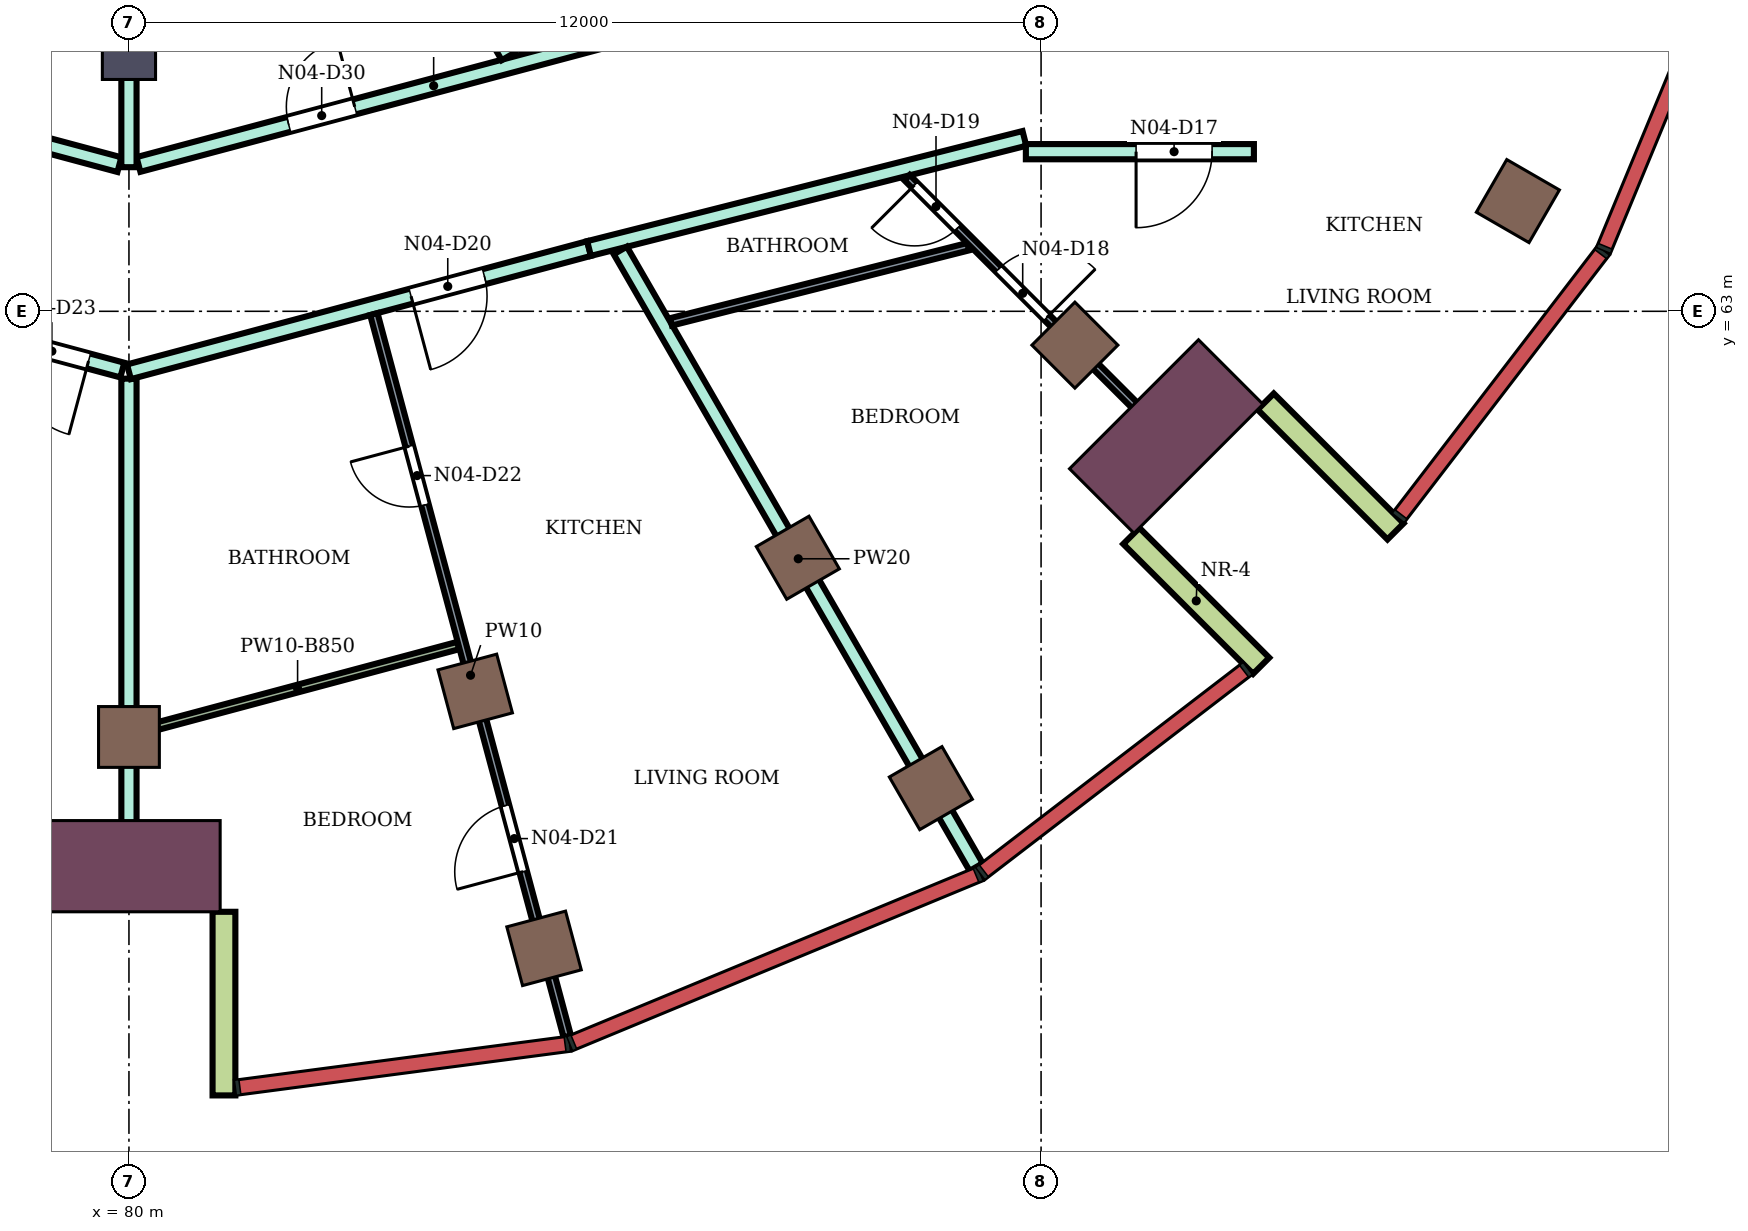
"""IFC4 building model, lengths in metres.
Left out: names, types, materials, properties, quantities, classifications, styles, units other than length and angle.
Written with IfcOpenShell. Run it as: python <this file> out.ifc"""

import sys

from ifc_helpers import new_model, si_unit, direction, frame, frame_2d, origin, origin_2d, place, context, subcontext, project, spatial, rectangle, extrude, element, fill, save


model = new_model("IFC4")
c1 = context("Model", 3, precision=1e-05, world=origin(), true_north=direction((0.0, 1.0)))
c2 = subcontext(c1, "Body", "Model", "MODEL_VIEW")
j1 = project(units=[si_unit("LENGTHUNIT", "METRE"), si_unit("PLANEANGLEUNIT", "RADIAN")], contexts=[c1])
p1 = place(None, origin())
s1 = spatial("IfcSite", under=j1, at=p1, CompositionType="ELEMENT")
p2 = place(p1, origin())
s2 = spatial("IfcBuilding", under=s1, at=p2, CompositionType="ELEMENT")
p3 = place(p2, frame((0.0, 0.0, 305.1)))
s3 = spatial("IfcBuildingStorey", under=s2, at=p3, CompositionType="ELEMENT", Elevation=305.1)
for number, where, z_axis, x_axis in (
    (1, (85.461, 54.619, 0.0), (0.0, 0.0, 1.0), (0.259, -0.966, 0.0)),
    (2, (90.55, 56.727, 0.0), (0.0, 0.0, 1.0), (0.5, -0.866, 0.0)),
    (3, (98.273, 64.45, 0.0), (0.0, 0.0, 1.0), (0.866, -0.5, 0.0)),
    (4, (80.0, 57.4, 0.0), (0.0, 0.0, 1.0), (0.0, -1.0, 0.0)),
    (5, (84.555, 58.0, 0.0), (0.0, 0.0, 1.0), (0.259, -0.966, 0.0)),
    (6, (88.8, 59.758, 0.0), (0.0, 0.0, 1.0), (0.5, -0.866, 0.0)),
    (7, (92.445, 62.555, 0.0), (0.0, 0.0, 1.0), (0.707, -0.707, 0.0)),
):
    element("IfcColumn", number, at=place(p3, frame(where, z_axis=z_axis, x_axis=x_axis)), inside=s3, PredefinedType="COLUMN", context=c2, shape_type="SweptSolid", body=[
        extrude(rectangle(XDim=0.8, YDim=0.8, at=origin_2d()), origin(), (0.0, 0.0, 1.0), 4.2),
    ])
p4 = place(p3, frame((80.0, 66.4, 0.0), z_axis=(0.0, 0.0, 1.0), x_axis=(0.0, -1.0, 0.0)))
e8 = element("IfcColumn", 8, at=p4, inside=s3, PredefinedType="COLUMN", context=c2, shape_type="SweptSolid", body=[
    extrude(rectangle(XDim=0.7, YDim=0.7, at=origin_2d()), origin(), (0.0, 0.0, 1.0), 4.2),
])
for number, where, z_axis, x_axis in (
    (9, (80.0, 55.7, 0.0), (0.0, 0.0, 1.0), (0.0, -1.0, 0.0)),
    (10, (93.647, 61.353, 0.0), (0.0, 0.0, 1.0), (0.707, -0.707, 0.0)),
):
    element("IfcColumn", number, at=place(p3, frame(where, z_axis=z_axis, x_axis=x_axis)), inside=s3, PredefinedType="COLUMN", context=c2, shape_type="SweptSolid", body=[
        extrude(rectangle(XDim=1.2, YDim=2.4, at=origin_2d()), origin(), (0.0, 0.0, 1.0), 4.2),
    ])
for number, where, z_axis, x_axis in (
    (11, (81.25, 55.1, 0.0), (0.0, 0.0, 1.0), (0.0, -1.0, 0.0)),
    (12, (93.188, 60.045, 0.0), (0.0, 0.0, 1.0), (0.707, -0.707, 0.0)),
    (13, (94.955, 61.812, 0.0), (0.0, 0.0, 1.0), (0.707, -0.707, 0.0)),
):
    element("IfcWall", number, at=place(p3, frame(where, z_axis=z_axis, x_axis=x_axis)), inside=s3, PredefinedType="NOTDEFINED", context=c2, shape_type="SweptSolid", body=[
        extrude(rectangle(XDim=2.416, YDim=0.3, at=frame_2d((1.208, 0.0))), origin(), (0.0, 0.0, 1.0), 4.2),
    ])
p5 = place(p3, frame((73.947, 63.826, 0.0), z_axis=(0.0, 0.0, 1.0), x_axis=(0.965902169454, -0.258907317479, 0.0)))
e14 = element("IfcWall", 14, at=p5, inside=s3, PredefinedType="PARTITIONING", context=c2, shape_type="SweptSolid", body=[
    extrude(rectangle(XDim=6.177, YDim=0.2, at=frame_2d((3.088, 0.0))), origin(), (0.0, 0.0, 1.0), 3.75),
])
p6 = place(p5, frame((4.717, 0.0, 0.0)))
e15 = element("IfcOpeningElement", 15, at=p6, cuts=e14, PredefinedType="OPENING", context=c2, shape_type="SweptSolid", body=[
    extrude(rectangle(XDim=1.0, YDim=2.1, at=frame_2d((0.5, 1.05))), frame((0.0, 0.11, 0.0), z_axis=(0.0, -1.0, 0.0), x_axis=(1.0, 0.0, 0.0)), (0.0, 0.0, 1.0), 0.22),
])
p7 = place(p3, frame((74.603, 66.342, 0.0), z_axis=(0.0, 0.0, 1.0), x_axis=(0.965920893652, -0.258837453254, 0.0)))
e16 = element("IfcWall", 16, at=p7, inside=s3, PredefinedType="PARTITIONING", context=c2, shape_type="SweptSolid", body=[
    extrude(rectangle(XDim=5.458, YDim=0.2, at=frame_2d((2.729, 0.0))), origin(), (0.0, 0.0, 1.0), 3.75),
])
p8 = place(p7, frame((2.512, 0.0, 0.0)))
e17 = element("IfcOpeningElement", 17, at=p8, cuts=e16, PredefinedType="OPENING", context=c2, shape_type="SweptSolid", body=[
    extrude(rectangle(XDim=0.9, YDim=2.1, at=frame_2d((0.45, 1.05))), frame((0.0, 0.11, 0.0), z_axis=(0.0, -1.0, 0.0), x_axis=(1.0, 0.0, 0.0)), (0.0, 0.0, 1.0), 0.22),
])
p9 = place(p3, frame((80.125, 64.932, 0.0), z_axis=(0.0, 0.0, 1.0), x_axis=(0.966236955806, 0.257655089674, 0.0)))
e18 = element("IfcWall", 18, at=p9, inside=s3, PredefinedType="PARTITIONING", context=c2, shape_type="SweptSolid", body=[
    extrude(rectangle(XDim=8.039, YDim=0.2, at=frame_2d((4.02, 0.0))), origin(), (0.0, 0.0, 1.0), 3.75),
])
p10 = place(p9, frame((6.298, 0.0, 0.0)))
e19 = element("IfcOpeningElement", 19, at=p10, cuts=e18, PredefinedType="OPENING", context=c2, shape_type="SweptSolid", body=[
    extrude(rectangle(XDim=0.9, YDim=2.1, at=frame_2d((0.45, 1.05))), frame((0.0, 0.11, 0.0), z_axis=(0.0, -1.0, 0.0), x_axis=(1.0, 0.0, 0.0)), (0.0, 0.0, 1.0), 0.22),
])
p11 = place(p9, frame((2.045, 0.0, 0.0)))
e20 = element("IfcOpeningElement", 20, at=p11, cuts=e18, PredefinedType="OPENING", context=c2, shape_type="SweptSolid", body=[
    extrude(rectangle(XDim=0.9, YDim=2.1, at=frame_2d((0.45, 1.05))), frame((0.0, 0.11, 0.0), z_axis=(0.0, -1.0, 0.0), x_axis=(1.0, 0.0, 0.0)), (0.0, 0.0, 1.0), 0.22),
])
p12 = place(p3, frame((80.0, 55.3, 0.0), z_axis=(0.0, 0.0, 1.0), x_axis=(0.0, 1.0, 0.0)))
e21 = element("IfcWall", 21, at=p12, inside=s3, PredefinedType="PARTITIONING", context=c2, shape_type="SweptSolid", body=[
    extrude(rectangle(XDim=6.814, YDim=0.2, at=frame_2d((3.407, 0.0))), origin(), (0.0, 0.0, 1.0), 3.75),
])
p13 = place(p3, frame((80.0, 62.204, 0.0), z_axis=(0.0, 0.0, 1.0), x_axis=(0.965938139786, 0.258773086132, 0.0)))
e22 = element("IfcWall", 22, at=p13, inside=s3, PredefinedType="PARTITIONING", context=c2, shape_type="SweptSolid", body=[
    extrude(rectangle(XDim=6.266, YDim=0.2, at=frame_2d((3.133, 0.0))), origin(), (0.0, 0.0, 1.0), 3.75),
])
p14 = place(p13, frame((3.842, 0.0, 0.0)))
e23 = element("IfcOpeningElement", 23, at=p14, cuts=e22, PredefinedType="OPENING", context=c2, shape_type="SweptSolid", body=[
    extrude(rectangle(XDim=1.0, YDim=2.1, at=frame_2d((0.5, 1.05))), frame((0.0, 0.11, 0.0), z_axis=(0.0, -1.0, 0.0), x_axis=(1.0, 0.0, 0.0)), (0.0, 0.0, 1.0), 0.22),
])
p15 = place(p3, frame((80.0, 64.896, 0.0), z_axis=(0.0, 0.0, 1.0), x_axis=(0.0, 1.0, 0.0)))
e24 = element("IfcWall", 24, at=p15, inside=s3, PredefinedType="PARTITIONING", context=c2, shape_type="SweptSolid", body=[
    extrude(rectangle(XDim=2.405, YDim=0.2, at=frame_2d((1.203, 0.0))), origin(), (0.0, 0.0, 1.0), 3.75),
])
p16 = place(p3, frame((83.848, 68.333, 0.0), z_axis=(0.0, 0.0, 1.0), x_axis=(0.499873506666, -0.866098422429, 0.0)))
e25 = element("IfcWall", 25, at=p16, inside=s3, PredefinedType="PARTITIONING", context=c2, shape_type="SweptSolid", body=[
    extrude(rectangle(XDim=2.285, YDim=0.2, at=frame_2d((1.143, 0.0))), origin(), (0.0, 0.0, 1.0), 3.75),
])
p17 = place(p3, frame((86.053, 63.826, 0.0), z_axis=(0.0, 0.0, 1.0), x_axis=(0.969490004987, 0.245130843083, 0.0)))
e26 = element("IfcWall", 26, at=p17, inside=s3, PredefinedType="PARTITIONING", context=c2, shape_type="SweptSolid", body=[
    extrude(rectangle(XDim=5.908, YDim=0.2, at=frame_2d((2.954, 0.0))), origin(), (0.0, 0.0, 1.0), 3.75),
])
p18 = place(p3, frame((86.464, 63.8, 0.0), z_axis=(0.0, 0.0, 1.0), x_axis=(0.499890179513, -0.866088799389, 0.0)))
e27 = element("IfcWall", 27, at=p18, inside=s3, PredefinedType="PARTITIONING", context=c2, shape_type="SweptSolid", body=[
    extrude(rectangle(XDim=9.366, YDim=0.2, at=frame_2d((4.683, 0.0))), origin(), (0.0, 0.0, 1.0), 3.75),
])
p19 = place(p3, frame((91.8, 65.1, 0.0), z_axis=(0.0, 0.0, 1.0), x_axis=(1.0, 0.0, 0.0)))
e28 = element("IfcWall", 28, at=p19, inside=s3, PredefinedType="PARTITIONING", context=c2, shape_type="SweptSolid", body=[
    extrude(rectangle(XDim=3.0, YDim=0.2, at=frame_2d((1.5, 0.0))), origin(), (0.0, 0.0, 1.0), 3.75),
])
p20 = place(p19, frame((1.45, 0.0, 0.0)))
e29 = element("IfcOpeningElement", 29, at=p20, cuts=e28, PredefinedType="OPENING", context=c2, shape_type="SweptSolid", body=[
    extrude(rectangle(XDim=1.0, YDim=2.1, at=frame_2d((0.5, 1.05))), frame((0.0, 0.11, 0.0), z_axis=(0.0, -1.0, 0.0), x_axis=(1.0, 0.0, 0.0)), (0.0, 0.0, 1.0), 0.22),
])
p21 = place(p3, frame((80.106, 57.47, 0.0), z_axis=(0.0, 0.0, 1.0), x_axis=(0.96592388346, 0.25882629573, 0.0)))
e30 = element("IfcWall", 30, at=p21, inside=s3, PredefinedType="PARTITIONING", context=c2, shape_type="SweptSolid", body=[
    extrude(rectangle(XDim=4.374, YDim=0.1, at=frame_2d((2.187, 0.0))), origin(), (0.0, 0.0, 1.0), 3.35),
])
p22 = place(p3, frame((83.222, 62.964, 0.0), z_axis=(0.0, 0.0, 1.0), x_axis=(0.25865876373, -0.965968759301, 0.0)))
e31 = element("IfcWall", 31, at=p22, inside=s3, PredefinedType="PARTITIONING", context=c2, shape_type="SweptSolid", body=[
    extrude(rectangle(XDim=9.838, YDim=0.1, at=frame_2d((4.919, 0.0))), origin(), (0.0, 0.0, 1.0), 3.75),
])
p23 = place(p22, frame((6.694, 0.0, 0.0)))
e32 = element("IfcOpeningElement", 32, at=p23, cuts=e31, PredefinedType="OPENING", context=c2, shape_type="SweptSolid", body=[
    extrude(rectangle(XDim=0.9, YDim=2.1, at=frame_2d((0.45, 1.05))), frame((0.0, 0.06, 0.0), z_axis=(0.0, -1.0, 0.0), x_axis=(1.0, 0.0, 0.0)), (0.0, 0.0, 1.0), 0.12),
])
p24 = place(p22, frame((1.8, 0.0, 0.0)))
e33 = element("IfcOpeningElement", 33, at=p24, cuts=e31, PredefinedType="OPENING", context=c2, shape_type="SweptSolid", body=[
    extrude(rectangle(XDim=0.8, YDim=2.1, at=frame_2d((0.4, 1.05))), frame((0.0, 0.06, 0.0), z_axis=(0.0, -1.0, 0.0), x_axis=(1.0, 0.0, 0.0)), (0.0, 0.0, 1.0), 0.12),
])
p25 = place(p3, frame((87.132, 62.861, 0.0), z_axis=(0.0, 0.0, 1.0), x_axis=(0.969469230998, 0.245212989354, 0.0)))
e34 = element("IfcWall", 34, at=p25, inside=s3, PredefinedType="PARTITIONING", context=c2, shape_type="SweptSolid", body=[
    extrude(rectangle(XDim=4.032, YDim=0.1, at=frame_2d((2.016, 0.0))), origin(), (0.0, 0.0, 1.0), 3.75),
])
p26 = place(p3, frame((90.237, 64.759, 0.0), z_axis=(0.0, 0.0, 1.0), x_axis=(0.706966449742, -0.707247084787, 0.0)))
e35 = element("IfcWall", 35, at=p26, inside=s3, PredefinedType="PARTITIONING", context=c2, shape_type="SweptSolid", body=[
    extrude(rectangle(XDim=5.22, YDim=0.1, at=frame_2d((2.61, 0.0))), origin(), (0.0, 0.0, 1.0), 3.75),
])
p27 = place(p26, frame((1.702, 0.0, 0.0)))
e36 = element("IfcOpeningElement", 36, at=p27, cuts=e35, PredefinedType="OPENING", context=c2, shape_type="SweptSolid", body=[
    extrude(rectangle(XDim=0.9, YDim=2.1, at=frame_2d((0.45, 1.05))), frame((0.0, 0.06, 0.0), z_axis=(0.0, -1.0, 0.0), x_axis=(1.0, 0.0, 0.0)), (0.0, 0.0, 1.0), 0.12),
])
p28 = place(p26, frame((0.139, 0.0, 0.0)))
e37 = element("IfcOpeningElement", 37, at=p28, cuts=e35, PredefinedType="OPENING", context=c2, shape_type="SweptSolid", body=[
    extrude(rectangle(XDim=0.8, YDim=2.1, at=frame_2d((0.4, 1.05))), frame((0.0, 0.06, 0.0), z_axis=(0.0, -1.0, 0.0), x_axis=(1.0, 0.0, 0.0)), (0.0, 0.0, 1.0), 0.12),
])
p29 = place(p20, frame((1.0, 0.0, 0.0), z_axis=(0.0, 0.0, 1.0), x_axis=(-1.0, 0.0, 0.0)))
e38 = element("IfcDoor", 38, at=p29, inside=s3, OperationType="SINGLE_SWING_RIGHT", PredefinedType="DOOR", context=c2, shape_type="SweptSolid", body=[
    extrude(rectangle(XDim=1.0, YDim=2.1, at=frame_2d((0.5, 1.05))), frame((0.0, 0.025, 0.0), z_axis=(0.0, -1.0, 0.0), x_axis=(1.0, 0.0, 0.0)), (0.0, 0.0, 1.0), 0.05),
])
fill(e29, e38)
p30 = place(p27, origin())
e39 = element("IfcDoor", 39, at=p30, inside=s3, OperationType="SINGLE_SWING_RIGHT", PredefinedType="DOOR", context=c2, shape_type="SweptSolid", body=[
    extrude(rectangle(XDim=0.9, YDim=2.1, at=frame_2d((0.45, 1.05))), frame((0.0, 0.025, 0.0), z_axis=(0.0, -1.0, 0.0), x_axis=(1.0, 0.0, 0.0)), (0.0, 0.0, 1.0), 0.05),
])
fill(e36, e39)
p31 = place(p28, frame((0.8, 0.0, 0.0), z_axis=(0.0, 0.0, 1.0), x_axis=(-1.0, 0.0, 0.0)))
e40 = element("IfcDoor", 40, at=p31, inside=s3, OperationType="SINGLE_SWING_RIGHT", PredefinedType="DOOR", context=c2, shape_type="SweptSolid", body=[
    extrude(rectangle(XDim=0.8, YDim=2.1, at=frame_2d((0.4, 1.05))), frame((0.0, 0.025, 0.0), z_axis=(0.0, -1.0, 0.0), x_axis=(1.0, 0.0, 0.0)), (0.0, 0.0, 1.0), 0.05),
])
fill(e37, e40)
p32 = place(p14, frame((1.0, 0.0, 0.0), z_axis=(0.0, 0.0, 1.0), x_axis=(-1.0, 0.0, 0.0)))
e41 = element("IfcDoor", 41, at=p32, inside=s3, OperationType="SINGLE_SWING_RIGHT", PredefinedType="DOOR", context=c2, shape_type="SweptSolid", body=[
    extrude(rectangle(XDim=1.0, YDim=2.1, at=frame_2d((0.5, 1.05))), frame((0.0, 0.025, 0.0), z_axis=(0.0, -1.0, 0.0), x_axis=(1.0, 0.0, 0.0)), (0.0, 0.0, 1.0), 0.05),
])
fill(e23, e41)
p33 = place(p23, frame((0.9, 0.0, 0.0), z_axis=(0.0, 0.0, 1.0), x_axis=(-1.0, 0.0, 0.0)))
e42 = element("IfcDoor", 42, at=p33, inside=s3, OperationType="SINGLE_SWING_LEFT", PredefinedType="DOOR", context=c2, shape_type="SweptSolid", body=[
    extrude(rectangle(XDim=0.9, YDim=2.1, at=frame_2d((0.45, 1.05))), frame((0.0, 0.025, 0.0), z_axis=(0.0, -1.0, 0.0), x_axis=(1.0, 0.0, 0.0)), (0.0, 0.0, 1.0), 0.05),
])
fill(e32, e42)
p34 = place(p24, frame((0.8, 0.0, 0.0), z_axis=(0.0, 0.0, 1.0), x_axis=(-1.0, 0.0, 0.0)))
e43 = element("IfcDoor", 43, at=p34, inside=s3, OperationType="SINGLE_SWING_RIGHT", PredefinedType="DOOR", context=c2, shape_type="SweptSolid", body=[
    extrude(rectangle(XDim=0.8, YDim=2.1, at=frame_2d((0.4, 1.05))), frame((0.0, 0.025, 0.0), z_axis=(0.0, -1.0, 0.0), x_axis=(1.0, 0.0, 0.0)), (0.0, 0.0, 1.0), 0.05),
])
fill(e33, e43)
p35 = place(p6, frame((1.0, 0.0, 0.0), z_axis=(0.0, 0.0, 1.0), x_axis=(-1.0, 0.0, 0.0)))
e44 = element("IfcDoor", 44, at=p35, inside=s3, OperationType="SINGLE_SWING_LEFT", PredefinedType="DOOR", context=c2, shape_type="SweptSolid", body=[
    extrude(rectangle(XDim=1.0, YDim=2.1, at=frame_2d((0.5, 1.05))), frame((0.0, 0.025, 0.0), z_axis=(0.0, -1.0, 0.0), x_axis=(1.0, 0.0, 0.0)), (0.0, 0.0, 1.0), 0.05),
])
fill(e15, e44)
p36 = place(p11, origin())
e45 = element("IfcDoor", 45, at=p36, inside=s3, OperationType="SINGLE_SWING_RIGHT", PredefinedType="DOOR", context=c2, shape_type="SweptSolid", body=[
    extrude(rectangle(XDim=0.9, YDim=2.1, at=frame_2d((0.45, 1.05))), frame((0.0, 0.025, 0.0), z_axis=(0.0, -1.0, 0.0), x_axis=(1.0, 0.0, 0.0)), (0.0, 0.0, 1.0), 0.05),
])
fill(e20, e45)
save(model, sys.argv[1])
